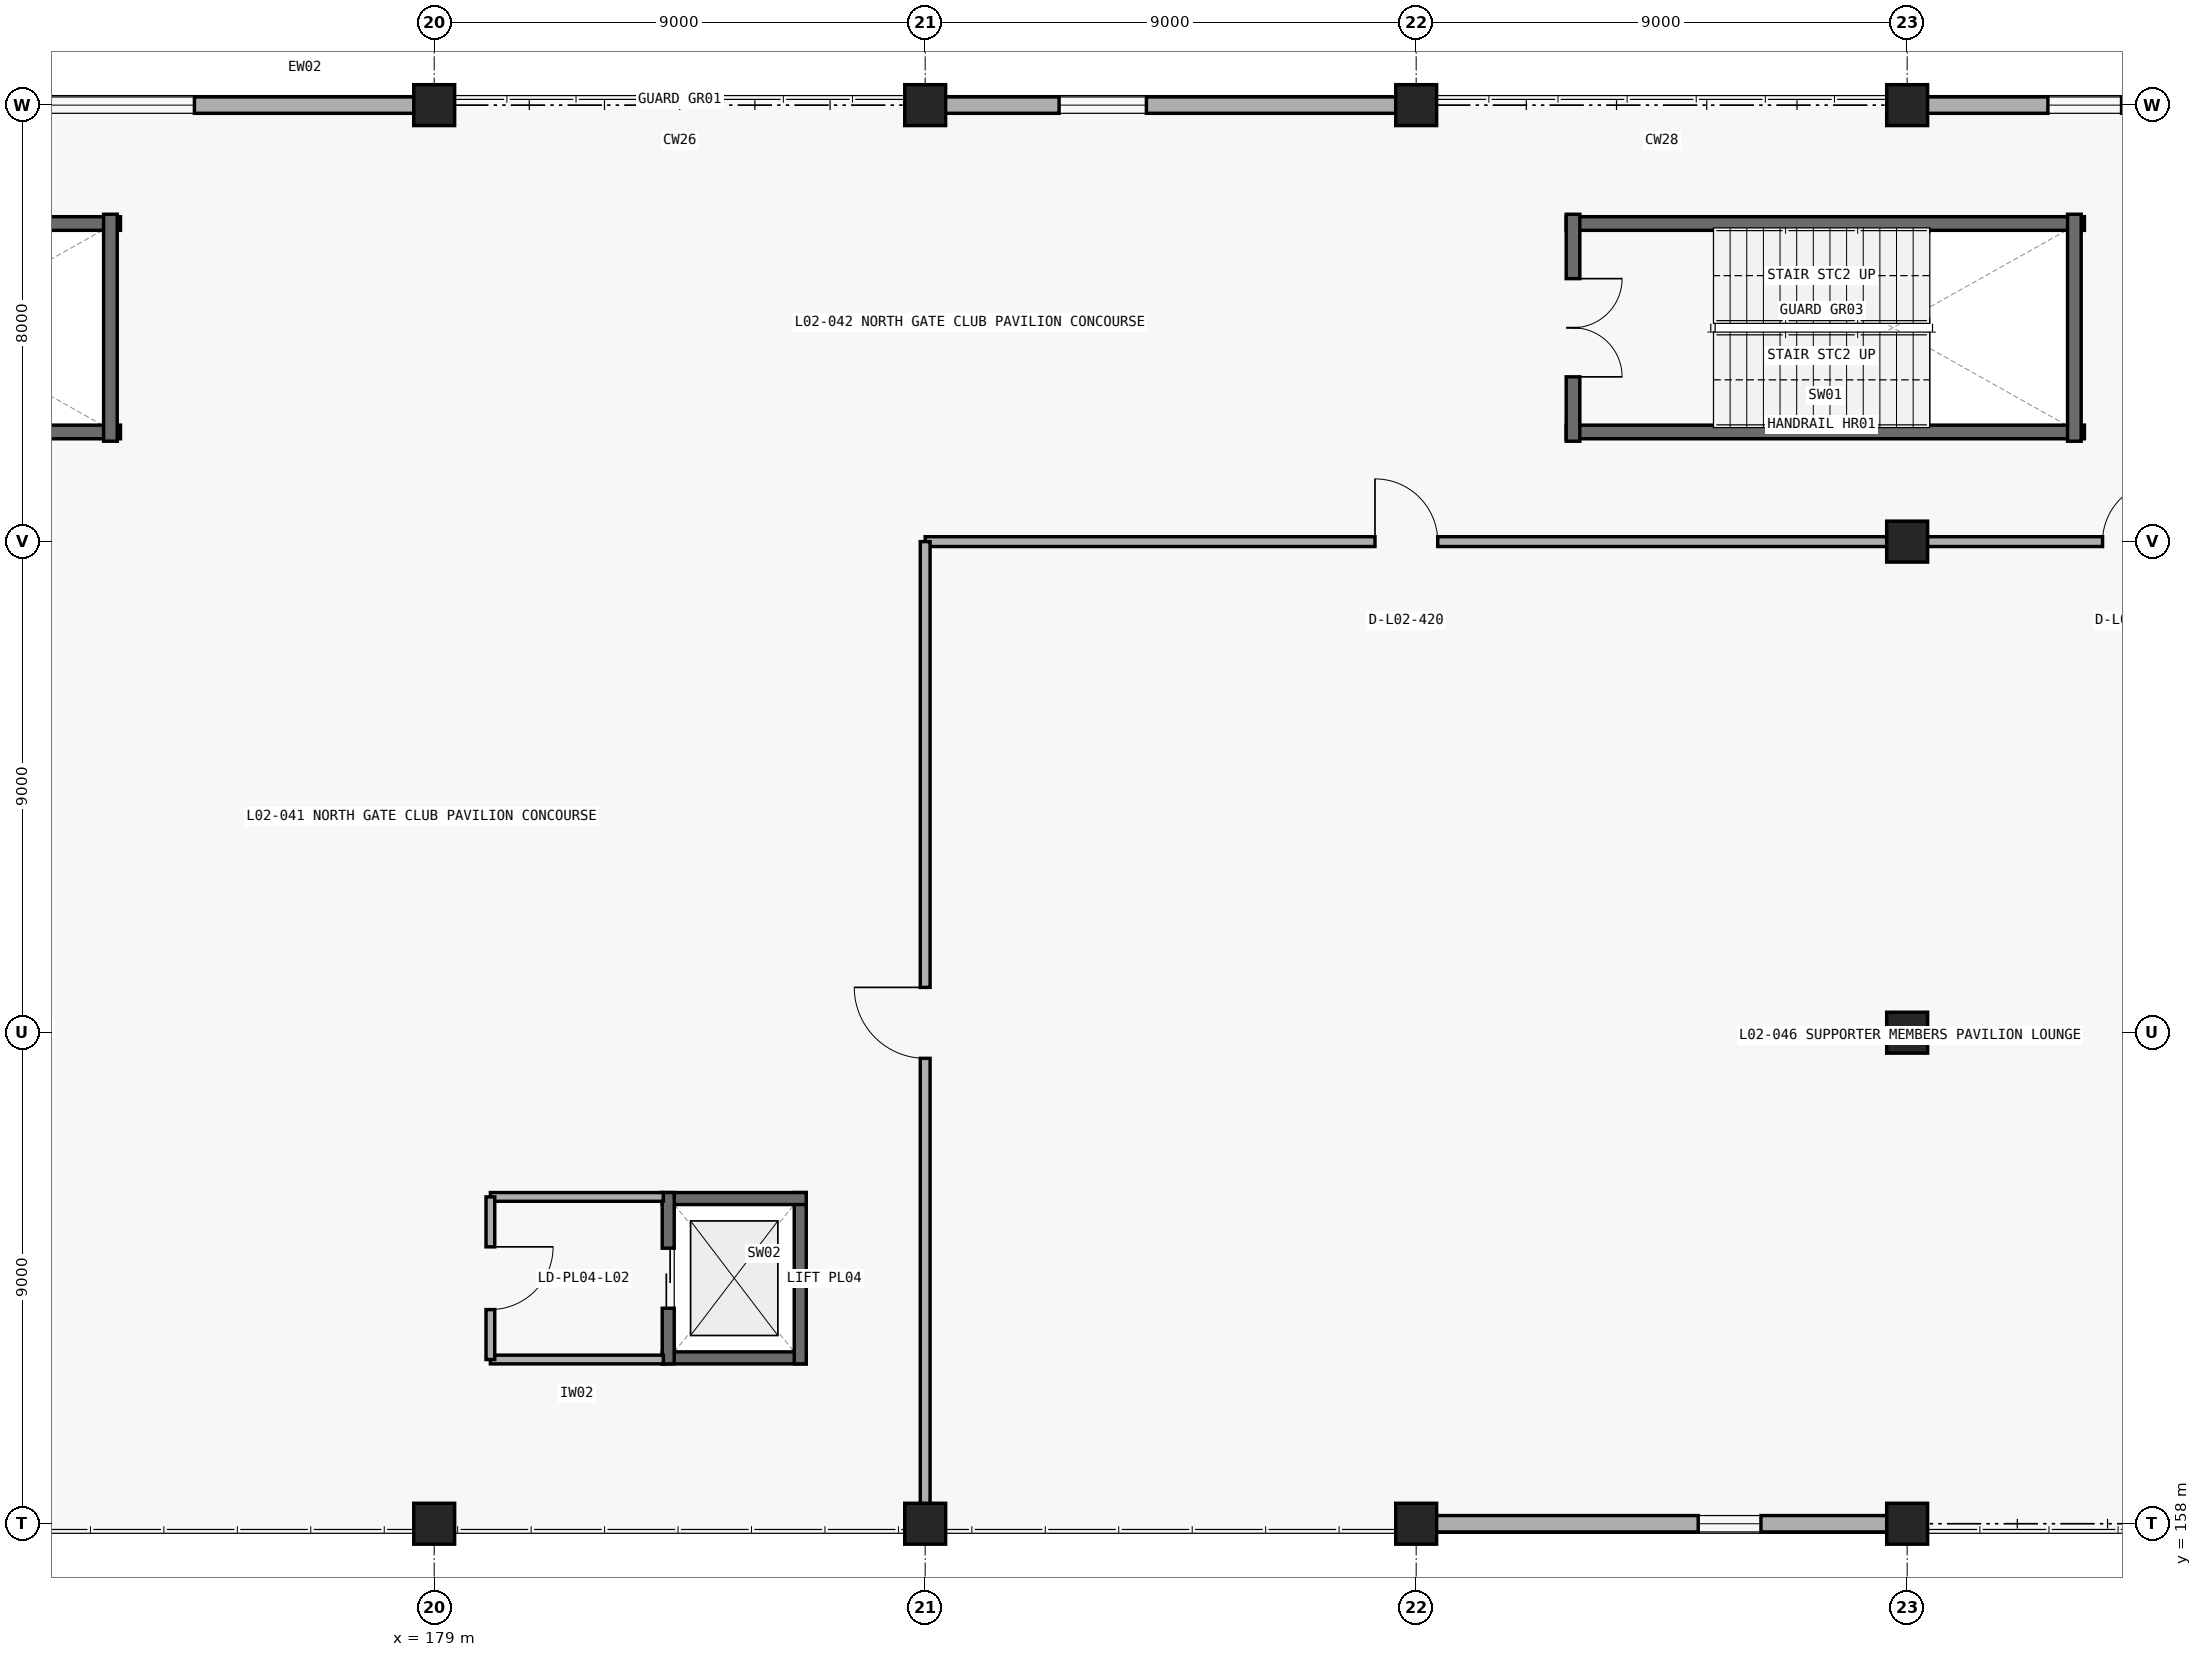
"""IFC4 building model, lengths in metres.
Left out: names, types, materials, properties, quantities, classifications, styles, units other than length and angle.
Written with IfcOpenShell. Run it as: python <this file> out.ifc"""

import sys

from ifc_helpers import new_model, si_unit, direction, frame, frame_2d, origin, origin_2d, place, context, subcontext, project, spatial, rectangle, extrude, element, fill, save


model = new_model("IFC4")
c1 = context("Model", 3, precision=1e-05, world=origin(), true_north=direction((0.0, 1.0)))
c2 = subcontext(c1, "Body", "Model", "MODEL_VIEW")
j1 = project(units=[si_unit("LENGTHUNIT", "METRE"), si_unit("PLANEANGLEUNIT", "RADIAN")], contexts=[c1])
p1 = place(None, origin())
s1 = spatial("IfcSite", under=j1, at=p1, CompositionType="ELEMENT")
p2 = place(p1, origin())
s2 = spatial("IfcBuilding", under=s1, at=p2, CompositionType="ELEMENT")
p3 = place(p2, frame((0.0, 0.0, 10.2)))
s3 = spatial("IfcBuildingStorey", under=s2, at=p3, CompositionType="ELEMENT", Elevation=10.2)
for number, where, z_axis, x_axis in (
    (1, (179.0, 158.0, 0.0), (0.0, 0.0, 1.0), (1.0, 0.0, 0.0)),
    (2, (179.0, 184.0, 0.0), (0.0, 0.0, 1.0), (1.0, 0.0, 0.0)),
    (3, (188.0, 158.0, 0.0), (0.0, 0.0, 1.0), (1.0, 0.0, 0.0)),
    (4, (188.0, 184.0, 0.0), (0.0, 0.0, 1.0), (1.0, 0.0, 0.0)),
    (5, (197.0, 158.0, 0.0), (0.0, 0.0, 1.0), (1.0, 0.0, 0.0)),
    (6, (197.0, 184.0, 0.0), (0.0, 0.0, 1.0), (1.0, 0.0, 0.0)),
    (7, (206.0, 158.0, 0.0), (0.0, 0.0, 1.0), (1.0, 0.0, 0.0)),
    (8, (206.0, 167.0, 0.0), (0.0, 0.0, 1.0), (1.0, 0.0, 0.0)),
    (9, (206.0, 176.0, 0.0), (0.0, 0.0, 1.0), (1.0, 0.0, 0.0)),
    (10, (206.0, 184.0, 0.0), (0.0, 0.0, 1.0), (1.0, 0.0, 0.0)),
):
    element("IfcColumn", number, at=place(p3, frame(where, z_axis=z_axis, x_axis=x_axis)), inside=s3, PredefinedType="COLUMN", context=c2, shape_type="SweptSolid", body=[
        extrude(rectangle(XDim=0.75, YDim=0.75, at=origin_2d()), origin(), (0.0, 0.0, 1.0), 4.8),
    ])
p4 = place(p3, frame((170.35, 184.0, 0.0), z_axis=(0.0, 0.0, 1.0), x_axis=(1.0, 0.0, 0.0)))
e11 = element("IfcWall", 11, at=p4, inside=s3, PredefinedType="STANDARD", context=c2, shape_type="SweptSolid", body=[
    extrude(rectangle(XDim=8.3, YDim=0.3, at=frame_2d((4.15, 0.0))), origin(), (0.0, 0.0, 1.0), 3.855),
])
p5 = place(p4, frame((1.555, 0.0, 0.95)))
e12 = element("IfcOpeningElement", 12, at=p5, cuts=e11, PredefinedType="OPENING", context=c2, shape_type="SweptSolid", body=[
    extrude(rectangle(XDim=2.7, YDim=2.25, at=frame_2d((1.35, 1.125))), frame((0.0, 0.16, 0.0), z_axis=(0.0, -1.0, 0.0), x_axis=(1.0, 0.0, 0.0)), (0.0, 0.0, 1.0), 0.32),
])
p6 = place(p3, frame((188.35, 184.0, 0.0), z_axis=(0.0, 0.0, 1.0), x_axis=(1.0, 0.0, 0.0)))
e13 = element("IfcWall", 13, at=p6, inside=s3, PredefinedType="STANDARD", context=c2, shape_type="SweptSolid", body=[
    extrude(rectangle(XDim=8.3, YDim=0.3, at=frame_2d((4.15, 0.0))), origin(), (0.0, 0.0, 1.0), 3.855),
])
p7 = place(p6, frame((2.105, 0.0, 0.95)))
e14 = element("IfcOpeningElement", 14, at=p7, cuts=e13, PredefinedType="OPENING", context=c2, shape_type="SweptSolid", body=[
    extrude(rectangle(XDim=1.6, YDim=1.6, at=frame_2d((0.8, 0.8))), frame((0.0, 0.16, 0.0), z_axis=(0.0, -1.0, 0.0), x_axis=(1.0, 0.0, 0.0)), (0.0, 0.0, 1.0), 0.32),
])
p8 = place(p3, frame((206.35, 184.0, 0.0), z_axis=(0.0, 0.0, 1.0), x_axis=(1.0, 0.0, 0.0)))
e15 = element("IfcWall", 15, at=p8, inside=s3, PredefinedType="STANDARD", context=c2, shape_type="SweptSolid", body=[
    extrude(rectangle(XDim=8.3, YDim=0.3, at=frame_2d((4.15, 0.0))), origin(), (0.0, 0.0, 1.0), 3.855),
])
p9 = place(p8, frame((2.23, 0.0, 0.95)))
e16 = element("IfcOpeningElement", 16, at=p9, cuts=e15, PredefinedType="OPENING", context=c2, shape_type="SweptSolid", body=[
    extrude(rectangle(XDim=1.35, YDim=1.9, at=frame_2d((0.675, 0.95))), frame((0.0, 0.16, 0.0), z_axis=(0.0, -1.0, 0.0), x_axis=(1.0, 0.0, 0.0)), (0.0, 0.0, 1.0), 0.32),
])
p10 = place(p3, frame((205.65, 158.0, 0.0), z_axis=(0.0, 0.0, 1.0), x_axis=(-1.0, 0.0, 0.0)))
e17 = element("IfcWall", 17, at=p10, inside=s3, PredefinedType="STANDARD", context=c2, shape_type="SweptSolid", body=[
    extrude(rectangle(XDim=8.3, YDim=0.3, at=frame_2d((4.15, 0.0))), origin(), (0.0, 0.0, 1.0), 3.855),
])
p11 = place(p10, frame((2.33, 0.0, 0.95)))
e18 = element("IfcOpeningElement", 18, at=p11, cuts=e17, PredefinedType="OPENING", context=c2, shape_type="SweptSolid", body=[
    extrude(rectangle(XDim=1.15, YDim=1.7, at=frame_2d((0.575, 0.85))), frame((0.0, 0.16, 0.0), z_axis=(0.0, -1.0, 0.0), x_axis=(1.0, 0.0, 0.0)), (0.0, 0.0, 1.0), 0.32),
])
for number, where, z_axis, x_axis in (
    (19, (199.75, 178.01, 0.0), (0.0, 0.0, 1.0), (1.0, 0.0, 0.0)),
    (20, (209.25, 181.83, 0.0), (0.0, 0.0, 1.0), (-1.0, 0.0, 0.0)),
):
    element("IfcWall", number, at=place(p3, frame(where, z_axis=z_axis, x_axis=x_axis)), inside=s3, PredefinedType="SHEAR", context=c2, shape_type="SweptSolid", body=[
        extrude(rectangle(XDim=9.5, YDim=0.25, at=frame_2d((4.75, 0.0))), origin(), (0.0, 0.0, 1.0), 4.5),
    ])
p12 = place(p3, frame((199.875, 182.0, 0.0), z_axis=(0.0, 0.0, 1.0), x_axis=(0.0, -1.0, 0.0)))
e21 = element("IfcWall", 21, at=p12, inside=s3, PredefinedType="SHEAR", context=c2, shape_type="SweptSolid", body=[
    extrude(rectangle(XDim=4.16, YDim=0.25, at=frame_2d((2.08, 0.0))), origin(), (0.0, 0.0, 1.0), 4.5),
])
p13 = place(p12, frame((1.18, 0.0, 0.0)))
e22 = element("IfcOpeningElement", 22, at=p13, cuts=e21, PredefinedType="OPENING", context=c2, shape_type="SweptSolid", body=[
    extrude(rectangle(XDim=1.8, YDim=2.25, at=frame_2d((0.9, 1.125))), frame((0.0, 0.135, 0.0), z_axis=(0.0, -1.0, 0.0), x_axis=(1.0, 0.0, 0.0)), (0.0, 0.0, 1.0), 0.27),
])
p14 = place(p3, frame((209.065, 177.84, 0.0), z_axis=(0.0, 0.0, 1.0), x_axis=(0.0, 1.0, 0.0)))
e23 = element("IfcWall", 23, at=p14, inside=s3, PredefinedType="SHEAR", context=c2, shape_type="SweptSolid", body=[
    extrude(rectangle(XDim=4.16, YDim=0.25, at=frame_2d((2.08, 0.0))), origin(), (0.0, 0.0, 1.0), 4.5),
])
for number, where, z_axis, x_axis in (
    (24, (163.75, 178.01, 0.0), (0.0, 0.0, 1.0), (1.0, 0.0, 0.0)),
    (25, (173.25, 181.83, 0.0), (0.0, 0.0, 1.0), (-1.0, 0.0, 0.0)),
):
    element("IfcWall", number, at=place(p3, frame(where, z_axis=z_axis, x_axis=x_axis)), inside=s3, PredefinedType="SHEAR", context=c2, shape_type="SweptSolid", body=[
        extrude(rectangle(XDim=9.5, YDim=0.25, at=frame_2d((4.75, 0.0))), origin(), (0.0, 0.0, 1.0), 4.5),
    ])
p15 = place(p3, frame((173.065, 177.84, 0.0), z_axis=(0.0, 0.0, 1.0), x_axis=(0.0, 1.0, 0.0)))
e26 = element("IfcWall", 26, at=p15, inside=s3, PredefinedType="SHEAR", context=c2, shape_type="SweptSolid", body=[
    extrude(rectangle(XDim=4.16, YDim=0.25, at=frame_2d((2.08, 0.0))), origin(), (0.0, 0.0, 1.0), 4.5),
])
p16 = place(p3, frame((183.18, 161.04, 0.0), z_axis=(0.0, 0.0, 1.0), x_axis=(1.0, 0.0, 0.0)))
e27 = element("IfcWall", 27, at=p16, inside=s3, PredefinedType="SHEAR", context=c2, shape_type="SweptSolid", body=[
    extrude(rectangle(XDim=2.64, YDim=0.22, at=frame_2d((1.32, 0.0))), origin(), (0.0, 0.0, 1.0), 4.5),
])
p17 = place(p3, frame((185.71, 160.93, 0.0), z_axis=(0.0, 0.0, 1.0), x_axis=(0.0, 1.0, 0.0)))
e28 = element("IfcWall", 28, at=p17, inside=s3, PredefinedType="SHEAR", context=c2, shape_type="SweptSolid", body=[
    extrude(rectangle(XDim=3.14, YDim=0.22, at=frame_2d((1.57, 0.0))), origin(), (0.0, 0.0, 1.0), 4.5),
])
p18 = place(p3, frame((185.82, 163.96, 0.0), z_axis=(0.0, 0.0, 1.0), x_axis=(-1.0, 0.0, 0.0)))
e29 = element("IfcWall", 29, at=p18, inside=s3, PredefinedType="SHEAR", context=c2, shape_type="SweptSolid", body=[
    extrude(rectangle(XDim=2.64, YDim=0.22, at=frame_2d((1.32, 0.0))), origin(), (0.0, 0.0, 1.0), 4.5),
])
p19 = place(p3, frame((183.29, 164.07, 0.0), z_axis=(0.0, 0.0, 1.0), x_axis=(0.0, -1.0, 0.0)))
e30 = element("IfcWall", 30, at=p19, inside=s3, PredefinedType="SHEAR", context=c2, shape_type="SweptSolid", body=[
    extrude(rectangle(XDim=3.14, YDim=0.22, at=frame_2d((1.57, 0.0))), origin(), (0.0, 0.0, 1.0), 4.5),
])
p20 = place(p19, frame((1.02, 0.0, 0.0)))
e31 = element("IfcOpeningElement", 31, at=p20, cuts=e30, PredefinedType="OPENING", context=c2, shape_type="SweptSolid", body=[
    extrude(rectangle(XDim=1.1, YDim=2.15, at=frame_2d((0.55, 1.075))), frame((0.0, 0.12, 0.0), z_axis=(0.0, -1.0, 0.0), x_axis=(1.0, 0.0, 0.0)), (0.0, 0.0, 1.0), 0.24),
])
for number, where, z_axis, x_axis in (
    (32, (183.2, 163.99, 0.0), (0.0, 0.0, 1.0), (-1.0, 0.0, 0.0)),
    (33, (183.2, 161.01, 0.0), (0.0, 0.0, 1.0), (-1.0, 0.0, 0.0)),
):
    element("IfcWall", number, at=place(p3, frame(where, z_axis=z_axis, x_axis=x_axis)), inside=s3, PredefinedType="PARTITIONING", context=c2, shape_type="SweptSolid", body=[
        extrude(rectangle(XDim=3.17, YDim=0.16, at=frame_2d((1.585, 0.0))), origin(), (0.0, 0.0, 1.0), 4.48),
    ])
p21 = place(p3, frame((180.03, 163.99, 0.0), z_axis=(0.0, 0.0, 1.0), x_axis=(0.0, -1.0, 0.0)))
e34 = element("IfcWall", 34, at=p21, inside=s3, PredefinedType="PARTITIONING", context=c2, shape_type="SweptSolid", body=[
    extrude(rectangle(XDim=2.98, YDim=0.16, at=frame_2d((1.49, 0.0))), origin(), (0.0, 0.0, 1.0), 4.48),
])
p22 = place(p21, frame((0.915, 0.0, 0.0)))
e35 = element("IfcOpeningElement", 35, at=p22, cuts=e34, PredefinedType="OPENING", context=c2, shape_type="SweptSolid", body=[
    extrude(rectangle(XDim=1.15, YDim=2.2, at=frame_2d((0.575, 1.1))), frame((0.0, 0.09, 0.0), z_axis=(0.0, -1.0, 0.0), x_axis=(1.0, 0.0, 0.0)), (0.0, 0.0, 1.0), 0.18),
])
p23 = place(p3, frame((188.0, 176.0, 0.0), z_axis=(0.0, 0.0, 1.0), x_axis=(1.0, 0.0, 0.0)))
e36 = element("IfcWall", 36, at=p23, inside=s3, PredefinedType="PARTITIONING", context=c2, shape_type="SweptSolid", body=[
    extrude(rectangle(XDim=17.64, YDim=0.18, at=frame_2d((8.82, 0.0))), origin(), (0.0, 0.0, 1.0), 4.48),
])
p24 = place(p23, frame((8.245, 0.0, 0.0)))
e37 = element("IfcOpeningElement", 37, at=p24, cuts=e36, PredefinedType="OPENING", context=c2, shape_type="SweptSolid", body=[
    extrude(rectangle(XDim=1.15, YDim=2.2, at=frame_2d((0.575, 1.1))), frame((0.0, 0.1, 0.0), z_axis=(0.0, -1.0, 0.0), x_axis=(1.0, 0.0, 0.0)), (0.0, 0.0, 1.0), 0.2),
])
p25 = place(p3, frame((205.625, 176.0, 0.0), z_axis=(0.0, 0.0, 1.0), x_axis=(1.0, 0.0, 0.0)))
e38 = element("IfcWall", 38, at=p25, inside=s3, PredefinedType="PARTITIONING", context=c2, shape_type="SweptSolid", body=[
    extrude(rectangle(XDim=9.015, YDim=0.18, at=frame_2d((4.507, 0.0))), origin(), (0.0, 0.0, 1.0), 3.855),
])
p26 = place(p25, frame((3.957, 0.0, 0.0)))
e39 = element("IfcOpeningElement", 39, at=p26, cuts=e38, PredefinedType="OPENING", context=c2, shape_type="SweptSolid", body=[
    extrude(rectangle(XDim=1.1, YDim=2.15, at=frame_2d((0.55, 1.075))), frame((0.0, 0.1, 0.0), z_axis=(0.0, -1.0, 0.0), x_axis=(1.0, 0.0, 0.0)), (0.0, 0.0, 1.0), 0.2),
])
p27 = place(p3, frame((188.0, 158.36, 0.0), z_axis=(0.0, 0.0, 1.0), x_axis=(0.0, 1.0, 0.0)))
e40 = element("IfcWall", 40, at=p27, inside=s3, PredefinedType="PARTITIONING", context=c2, shape_type="SweptSolid", body=[
    extrude(rectangle(XDim=17.64, YDim=0.18, at=frame_2d((8.82, 0.0))), origin(), (0.0, 0.0, 1.0), 4.48),
])
p28 = place(p27, frame((8.17, 0.0, 0.0)))
e41 = element("IfcOpeningElement", 41, at=p28, cuts=e40, PredefinedType="OPENING", context=c2, shape_type="SweptSolid", body=[
    extrude(rectangle(XDim=1.3, YDim=2.25, at=frame_2d((0.65, 1.125))), frame((0.0, 0.1, 0.0), z_axis=(0.0, -1.0, 0.0), x_axis=(1.0, 0.0, 0.0)), (0.0, 0.0, 1.0), 0.2),
])
p29 = place(p5, origin())
e42 = element("IfcWindow", 42, at=p29, inside=s3, PartitioningType="SINGLE_PANEL", PredefinedType="WINDOW", context=c2, shape_type="SweptSolid", body=[
    extrude(rectangle(XDim=2.7, YDim=2.25, at=frame_2d((1.35, 1.125))), frame((0.0, 0.03, 0.0), z_axis=(0.0, -1.0, 0.0), x_axis=(1.0, 0.0, 0.0)), (0.0, 0.0, 1.0), 0.06),
])
fill(e12, e42)
p30 = place(p7, origin())
e43 = element("IfcWindow", 43, at=p30, inside=s3, PartitioningType="SINGLE_PANEL", PredefinedType="WINDOW", context=c2, shape_type="SweptSolid", body=[
    extrude(rectangle(XDim=1.6, YDim=1.6, at=frame_2d((0.8, 0.8))), frame((0.0, 0.03, 0.0), z_axis=(0.0, -1.0, 0.0), x_axis=(1.0, 0.0, 0.0)), (0.0, 0.0, 1.0), 0.06),
])
fill(e14, e43)
p31 = place(p9, origin())
e44 = element("IfcWindow", 44, at=p31, inside=s3, PartitioningType="SINGLE_PANEL", PredefinedType="WINDOW", context=c2, shape_type="SweptSolid", body=[
    extrude(rectangle(XDim=1.35, YDim=1.9, at=frame_2d((0.675, 0.95))), frame((0.0, 0.03, 0.0), z_axis=(0.0, -1.0, 0.0), x_axis=(1.0, 0.0, 0.0)), (0.0, 0.0, 1.0), 0.06),
])
fill(e16, e44)
p32 = place(p11, origin())
e45 = element("IfcWindow", 45, at=p32, inside=s3, PartitioningType="SINGLE_PANEL", PredefinedType="WINDOW", context=c2, shape_type="SweptSolid", body=[
    extrude(rectangle(XDim=1.15, YDim=1.7, at=frame_2d((0.575, 0.85))), frame((0.0, 0.03, 0.0), z_axis=(0.0, -1.0, 0.0), x_axis=(1.0, 0.0, 0.0)), (0.0, 0.0, 1.0), 0.06),
])
fill(e18, e45)
p33 = place(p13, origin())
e46 = element("IfcDoor", 46, at=p33, inside=s3, OperationType="DOUBLE_DOOR_SINGLE_SWING", PredefinedType="DOOR", context=c2, shape_type="SweptSolid", body=[
    extrude(rectangle(XDim=1.8, YDim=2.25, at=frame_2d((0.9, 1.125))), frame((0.0, 0.025, 0.0), z_axis=(0.0, -1.0, 0.0), x_axis=(1.0, 0.0, 0.0)), (0.0, 0.0, 1.0), 0.05),
])
fill(e22, e46)
p34 = place(p20, origin())
e47 = element("IfcDoor", 47, at=p34, inside=s3, OperationType="SLIDING_TO_LEFT", PredefinedType="DOOR", context=c2, shape_type="SweptSolid", body=[
    extrude(rectangle(XDim=1.1, YDim=2.15, at=frame_2d((0.55, 1.075))), frame((0.0, 0.025, 0.0), z_axis=(0.0, -1.0, 0.0), x_axis=(1.0, 0.0, 0.0)), (0.0, 0.0, 1.0), 0.05),
])
fill(e31, e47)
p35 = place(p22, origin())
e48 = element("IfcDoor", 48, at=p35, inside=s3, OperationType="SINGLE_SWING_LEFT", PredefinedType="DOOR", context=c2, shape_type="SweptSolid", body=[
    extrude(rectangle(XDim=1.15, YDim=2.2, at=frame_2d((0.575, 1.1))), frame((0.0, 0.025, 0.0), z_axis=(0.0, -1.0, 0.0), x_axis=(1.0, 0.0, 0.0)), (0.0, 0.0, 1.0), 0.05),
])
fill(e35, e48)
p36 = place(p24, origin())
e49 = element("IfcDoor", 49, at=p36, inside=s3, OperationType="SINGLE_SWING_LEFT", PredefinedType="DOOR", context=c2, shape_type="SweptSolid", body=[
    extrude(rectangle(XDim=1.15, YDim=2.2, at=frame_2d((0.575, 1.1))), frame((0.0, 0.025, 0.0), z_axis=(0.0, -1.0, 0.0), x_axis=(1.0, 0.0, 0.0)), (0.0, 0.0, 1.0), 0.05),
])
fill(e37, e49)
p37 = place(p26, origin())
e50 = element("IfcDoor", 50, at=p37, inside=s3, OperationType="SINGLE_SWING_RIGHT", PredefinedType="DOOR", context=c2, shape_type="SweptSolid", body=[
    extrude(rectangle(XDim=1.1, YDim=2.15, at=frame_2d((0.55, 1.075))), frame((0.0, 0.025, 0.0), z_axis=(0.0, -1.0, 0.0), x_axis=(1.0, 0.0, 0.0)), (0.0, 0.0, 1.0), 0.05),
])
fill(e39, e50)
p38 = place(p28, origin())
e51 = element("IfcDoor", 51, at=p38, inside=s3, OperationType="SINGLE_SWING_RIGHT", PredefinedType="DOOR", context=c2, shape_type="SweptSolid", body=[
    extrude(rectangle(XDim=1.3, YDim=2.25, at=frame_2d((0.65, 1.125))), frame((0.0, 0.025, 0.0), z_axis=(0.0, -1.0, 0.0), x_axis=(1.0, 0.0, 0.0)), (0.0, 0.0, 1.0), 0.05),
])
fill(e41, e51)
save(model, sys.argv[1])
